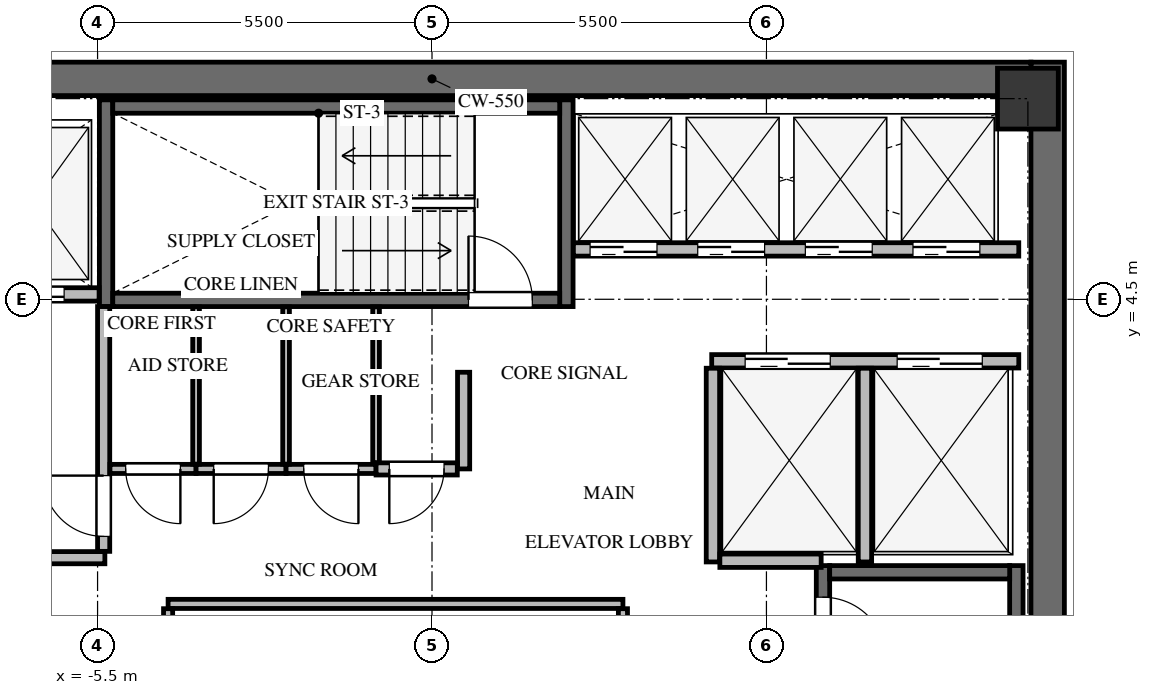
"""IFC4 building model, lengths in metres.
Left out: names, types, materials, properties, quantities, classifications, styles, units other than length and angle.
Written with IfcOpenShell. Run it as: python <this file> out.ifc"""

import sys

from ifc_helpers import new_model, si_unit, direction, frame, frame_2d, origin, origin_2d, place, context, subcontext, project, spatial, rectangle, extrude, source, transform, mapped, element, fill, save


model = new_model("IFC4")
c1 = context("Model", 3, precision=1e-05, world=origin(), true_north=direction((0.0, 1.0)))
c2 = subcontext(c1, "Body", "Model", "MODEL_VIEW")
j1 = project(units=[si_unit("LENGTHUNIT", "METRE"), si_unit("PLANEANGLEUNIT", "RADIAN")], contexts=[c1])
p1 = place(None, origin())
s1 = spatial("IfcSite", under=j1, at=p1, CompositionType="ELEMENT")
p2 = place(p1, origin())
s2 = spatial("IfcBuilding", under=s1, at=p2, CompositionType="ELEMENT")
p3 = place(p2, frame((0.0, 0.0, 261.5)))
s3 = spatial("IfcBuildingStorey", under=s2, at=p3, CompositionType="ELEMENT", Elevation=261.5)
p4 = place(p3, frame((10.125, -8.4, 0.0), z_axis=(0.0, 0.0, 1.0), x_axis=(0.0, 1.0, 0.0)))
e1 = element("IfcWall", 1, at=p4, inside=s3, PredefinedType="SHEAR", context=c2, shape_type="SweptSolid", body=[
    extrude(rectangle(XDim=16.8, YDim=0.55, at=frame_2d((8.4, 0.0))), origin(), (0.0, 0.0, 1.0), 3.4),
])
p5 = place(p3, frame((-9.85, 8.125, 0.0), z_axis=(0.0, 0.0, 1.0), x_axis=(1.0, 0.0, 0.0)))
e2 = element("IfcWall", 2, at=p5, inside=s3, PredefinedType="SHEAR", context=c2, shape_type="SweptSolid", body=[
    extrude(rectangle(XDim=19.7, YDim=0.55, at=frame_2d((9.85, 0.0))), origin(), (0.0, 0.0, 1.0), 3.4),
])
p6 = place(p3, frame((9.61, -7.77, -0.24), z_axis=(0.0, 0.0, 1.0), x_axis=(0.0, 1.0, 0.0)))
e3 = element("IfcWall", 3, at=p6, inside=s3, PredefinedType="SHEAR", context=c2, shape_type="SweptSolid", body=[
    extrude(rectangle(XDim=7.89, YDim=0.22, at=frame_2d((3.945, 0.0))), origin(), (0.0, 0.0, 1.0), 3.34),
])
p7 = place(p3, frame((6.43, 0.12, -0.24), z_axis=(0.0, 0.0, 1.0), x_axis=(0.0, -1.0, 0.0)))
e4 = element("IfcWall", 4, at=p7, inside=s3, PredefinedType="SHEAR", context=c2, shape_type="SweptSolid", body=[
    extrude(rectangle(XDim=7.89, YDim=0.22, at=frame_2d((3.945, 0.0))), origin(), (0.0, 0.0, 1.0), 3.34),
])
p8 = place(p7, frame((0.52, 0.0, 0.0)))
e5 = element("IfcOpeningElement", 5, at=p8, cuts=e4, PredefinedType="OPENING", context=c2, shape_type="SweptSolid", body=[
    extrude(rectangle(XDim=1.05, YDim=2.15, at=frame_2d((0.525, 1.075))), frame((0.0, 0.12, 0.0), z_axis=(0.0, -1.0, 0.0), x_axis=(1.0, 0.0, 0.0)), (0.0, 0.0, 1.0), 0.24),
])
p9 = place(p3, frame((9.5, 0.01, -0.24), z_axis=(0.0, 0.0, 1.0), x_axis=(-1.0, 0.0, 0.0)))
e6 = element("IfcWall", 6, at=p9, inside=s3, PredefinedType="SHEAR", context=c2, shape_type="SweptSolid", body=[
    extrude(rectangle(XDim=2.96, YDim=0.22, at=frame_2d((1.48, 0.0))), origin(), (0.0, 0.0, 1.0), 3.34),
])
for number, where, z_axis, x_axis in (
    (7, (2.21, 4.38, -0.24), (0.0, 0.0, 1.0), (0.0, 1.0, 0.0)),
    (8, (-5.36, 7.78, -0.24), (0.0, 0.0, 1.0), (0.0, -1.0, 0.0)),
):
    element("IfcWall", number, at=place(p3, frame(where, z_axis=z_axis, x_axis=x_axis)), inside=s3, PredefinedType="SHEAR", context=c2, shape_type="SweptSolid", body=[
        extrude(rectangle(XDim=3.4, YDim=0.22, at=frame_2d((1.7, 0.0))), origin(), (0.0, 0.0, 1.0), 3.34),
    ])
p10 = place(p3, frame((-5.25, 4.49, -0.24), z_axis=(0.0, 0.0, 1.0), x_axis=(1.0, 0.0, 0.0)))
e9 = element("IfcWall", 9, at=p10, inside=s3, PredefinedType="SHEAR", context=c2, shape_type="SweptSolid", body=[
    extrude(rectangle(XDim=7.35, YDim=0.22, at=frame_2d((3.675, 0.0))), origin(), (0.0, 0.0, 1.0), 3.34),
])
p11 = place(p10, frame((5.85, 0.0, 0.0)))
e10 = element("IfcOpeningElement", 10, at=p11, cuts=e9, PredefinedType="OPENING", context=c2, shape_type="SweptSolid", body=[
    extrude(rectangle(XDim=1.05, YDim=2.15, at=frame_2d((0.525, 1.075))), frame((0.0, 0.12, 0.0), z_axis=(0.0, -1.0, 0.0), x_axis=(1.0, 0.0, 0.0)), (0.0, 0.0, 1.0), 0.24),
])
p12 = place(p3, frame((2.1, 7.67, -0.24), z_axis=(0.0, 0.0, 1.0), x_axis=(-1.0, 0.0, 0.0)))
e11 = element("IfcWall", 11, at=p12, inside=s3, PredefinedType="SHEAR", context=c2, shape_type="SweptSolid", body=[
    extrude(rectangle(XDim=7.35, YDim=0.22, at=frame_2d((3.675, 0.0))), origin(), (0.0, 0.0, 1.0), 3.34),
])
m1 = source(origin(), c2, "Body", "SweptSolid", [
    extrude(rectangle(XDim=1.0, YDim=1.0, at=origin_2d()), origin(), (0.0, 0.0, 1.0), 3.34),
])
p13 = place(p3, frame((9.8, 7.8, -0.24), z_axis=(0.0, 0.0, 1.0), x_axis=(1.0, 0.0, 0.0)))
e12 = element("IfcColumn", 12, at=p13, inside=s3, PredefinedType="COLUMN", context=c2, shape_type="MappedRepresentation", body=[
    mapped(m1, transform((0.0, 0.0, 0.0), x_axis=(1.0, 0.0, 0.0), y_axis=(0.0, 1.0, 0.0), z_axis=(0.0, 0.0, 1.0), scale=1.0)),
])
p14 = place(p3, frame((-9.65, 4.58, 0.0), z_axis=(0.0, 0.0, 1.0), x_axis=(1.0, 0.0, 0.0)))
e13 = element("IfcWall", 13, at=p14, inside=s3, PredefinedType="SOLIDWALL", context=c2, shape_type="SweptSolid", body=[
    extrude(rectangle(XDim=4.175, YDim=0.22, at=frame_2d((2.087, 0.0))), origin(), (0.0, 0.0, 1.0), 3.085),
])
p15 = place(p14, frame((0.4, 0.0, 0.0)))
e14 = element("IfcOpeningElement", 14, at=p15, cuts=e13, PredefinedType="OPENING", context=c2, shape_type="SweptSolid", body=[
    extrude(rectangle(XDim=1.2, YDim=2.15, at=frame_2d((0.6, 1.075))), frame((0.0, 0.12, 0.0), z_axis=(0.0, -1.0, 0.0), x_axis=(1.0, 0.0, 0.0)), (0.0, 0.0, 1.0), 0.24),
])
p16 = place(p14, frame((2.4, 0.0, 0.0)))
e15 = element("IfcOpeningElement", 15, at=p16, cuts=e13, PredefinedType="OPENING", context=c2, shape_type="SweptSolid", body=[
    extrude(rectangle(XDim=1.2, YDim=2.15, at=frame_2d((0.6, 1.075))), frame((0.0, 0.12, 0.0), z_axis=(0.0, -1.0, 0.0), x_axis=(1.0, 0.0, 0.0)), (0.0, 0.0, 1.0), 0.24),
])
p17 = place(p3, frame((-9.65, 0.25, 0.0), z_axis=(0.0, 0.0, 1.0), x_axis=(1.0, 0.0, 0.0)))
e16 = element("IfcWall", 16, at=p17, inside=s3, PredefinedType="SOLIDWALL", context=c2, shape_type="SweptSolid", body=[
    extrude(rectangle(XDim=4.27, YDim=0.2, at=frame_2d((2.135, 0.0))), origin(), (0.0, 0.0, 1.0), 3.085),
])
p18 = place(p3, frame((-5.4, 0.354, 0.0), z_axis=(0.0, 0.0, 1.0), x_axis=(0.0, 1.0, 0.0)))
e17 = element("IfcWall", 17, at=p18, inside=s3, PredefinedType="SOLIDWALL", context=c2, shape_type="SweptSolid", body=[
    extrude(rectangle(XDim=4.026, YDim=0.2, at=frame_2d((2.013, 0.0))), origin(), (0.0, 0.0, 1.0), 3.085),
])
p19 = place(p18, frame((0.246, 0.0, 0.0)))
e18 = element("IfcOpeningElement", 18, at=p19, cuts=e17, PredefinedType="OPENING", context=c2, shape_type="SweptSolid", body=[
    extrude(rectangle(XDim=1.0, YDim=2.15, at=frame_2d((0.5, 1.075))), frame((0.0, 0.11, 0.0), z_axis=(0.0, -1.0, 0.0), x_axis=(1.0, 0.0, 0.0)), (0.0, 0.0, 1.0), 0.22),
])
p20 = place(p3, frame((4.6, 3.48, 0.0), z_axis=(0.0, 0.0, 1.0), x_axis=(1.0, 0.0, 0.0)))
e19 = element("IfcWall", 19, at=p20, inside=s3, PredefinedType="SOLIDWALL", context=c2, shape_type="SweptSolid", body=[
    extrude(rectangle(XDim=5.05, YDim=0.22, at=frame_2d((2.525, 0.0))), origin(), (0.0, 0.0, 1.0), 3.085),
])
p21 = place(p20, frame((0.55, 0.0, 0.0)))
e20 = element("IfcOpeningElement", 20, at=p21, cuts=e19, PredefinedType="OPENING", context=c2, shape_type="SweptSolid", body=[
    extrude(rectangle(XDim=1.4, YDim=2.15, at=frame_2d((0.7, 1.075))), frame((0.0, 0.12, 0.0), z_axis=(0.0, -1.0, 0.0), x_axis=(1.0, 0.0, 0.0)), (0.0, 0.0, 1.0), 0.24),
])
p22 = place(p20, frame((3.05, 0.0, 0.0)))
e21 = element("IfcOpeningElement", 21, at=p22, cuts=e19, PredefinedType="OPENING", context=c2, shape_type="SweptSolid", body=[
    extrude(rectangle(XDim=1.4, YDim=2.15, at=frame_2d((0.7, 1.075))), frame((0.0, 0.12, 0.0), z_axis=(0.0, -1.0, 0.0), x_axis=(1.0, 0.0, 0.0)), (0.0, 0.0, 1.0), 0.24),
])
for number, where, z_axis, x_axis in (
    (22, (4.62, 0.18, 0.0), (0.0, 0.0, 1.0), (0.0, 1.0, 0.0)),
    (23, (7.12, 0.18, 0.0), (0.0, 0.0, 1.0), (0.0, 1.0, 0.0)),
):
    element("IfcWall", number, at=place(p3, frame(where, z_axis=z_axis, x_axis=x_axis)), inside=s3, PredefinedType="SOLIDWALL", context=c2, shape_type="SweptSolid", body=[
        extrude(rectangle(XDim=3.186, YDim=0.22, at=frame_2d((1.593, 0.0))), origin(), (0.0, 0.0, 1.0), 3.085),
    ])
p23 = place(p3, frame((4.734, 0.2, 0.0), z_axis=(0.0, 0.0, 1.0), x_axis=(1.0, 0.0, 0.0)))
e24 = element("IfcWall", 24, at=p23, inside=s3, PredefinedType="SOLIDWALL", context=c2, shape_type="SweptSolid", body=[
    extrude(rectangle(XDim=1.666, YDim=0.22, at=frame_2d((0.833, 0.0))), origin(), (0.0, 0.0, 1.0), 3.085),
])
p24 = place(p3, frame((2.325, 5.32, 0.0), z_axis=(0.0, 0.0, 1.0), x_axis=(1.0, 0.0, 0.0)))
e25 = element("IfcWall", 25, at=p24, inside=s3, PredefinedType="SOLIDWALL", context=c2, shape_type="SweptSolid", body=[
    extrude(rectangle(XDim=7.325, YDim=0.22, at=frame_2d((3.663, 0.0))), origin(), (0.0, 0.0, 1.0), 3.085),
])
p25 = place(p24, frame((0.275, 0.0, 0.0)))
e26 = element("IfcOpeningElement", 26, at=p25, cuts=e25, PredefinedType="OPENING", context=c2, shape_type="SweptSolid", body=[
    extrude(rectangle(XDim=1.1, YDim=2.15, at=frame_2d((0.55, 1.075))), frame((0.0, 0.12, 0.0), z_axis=(0.0, -1.0, 0.0), x_axis=(1.0, 0.0, 0.0)), (0.0, 0.0, 1.0), 0.24),
])
p26 = place(p24, frame((2.045, 0.0, 0.0)))
e27 = element("IfcOpeningElement", 27, at=p26, cuts=e25, PredefinedType="OPENING", context=c2, shape_type="SweptSolid", body=[
    extrude(rectangle(XDim=1.1, YDim=2.15, at=frame_2d((0.55, 1.075))), frame((0.0, 0.12, 0.0), z_axis=(0.0, -1.0, 0.0), x_axis=(1.0, 0.0, 0.0)), (0.0, 0.0, 1.0), 0.24),
])
p27 = place(p24, frame((3.815, 0.0, 0.0)))
e28 = element("IfcOpeningElement", 28, at=p27, cuts=e25, PredefinedType="OPENING", context=c2, shape_type="SweptSolid", body=[
    extrude(rectangle(XDim=1.1, YDim=2.15, at=frame_2d((0.55, 1.075))), frame((0.0, 0.12, 0.0), z_axis=(0.0, -1.0, 0.0), x_axis=(1.0, 0.0, 0.0)), (0.0, 0.0, 1.0), 0.24),
])
p28 = place(p24, frame((5.585, 0.0, 0.0)))
e29 = element("IfcOpeningElement", 29, at=p28, cuts=e25, PredefinedType="OPENING", context=c2, shape_type="SweptSolid", body=[
    extrude(rectangle(XDim=1.1, YDim=2.15, at=frame_2d((0.55, 1.075))), frame((0.0, 0.12, 0.0), z_axis=(0.0, -1.0, 0.0), x_axis=(1.0, 0.0, 0.0)), (0.0, 0.0, 1.0), 0.24),
])
p29 = place(p3, frame((-4.34, -0.51, 0.0), z_axis=(0.0, 0.0, 1.0), x_axis=(1.0, 0.0, 0.0)))
e30 = element("IfcWall", 30, at=p29, inside=s3, PredefinedType="PARTITIONING", context=c2, shape_type="SweptSolid", body=[
    extrude(rectangle(XDim=7.48, YDim=0.15, at=frame_2d((3.74, 0.0))), origin(), (0.0, 0.0, 1.0), 3.085),
])
for number, where, z_axis, x_axis in (
    (31, (-4.34, -2.961, 0.0), (0.0, 0.0, 1.0), (0.0, 1.0, 0.0)),
    (32, (3.14, -0.589, 0.0), (0.0, 0.0, 1.0), (0.0, -1.0, 0.0)),
):
    element("IfcWall", number, at=place(p3, frame(where, z_axis=z_axis, x_axis=x_axis)), inside=s3, PredefinedType="PARTITIONING", context=c2, shape_type="SweptSolid", body=[
        extrude(rectangle(XDim=2.372, YDim=0.15, at=frame_2d((1.186, 0.0))), origin(), (0.0, 0.0, 1.0), 3.085),
    ])
p30 = place(p3, frame((-3.88, 1.71, 0.0), z_axis=(0.0, 0.0, 1.0), x_axis=(-1.0, 0.0, 0.0)))
e33 = element("IfcWall", 33, at=p30, inside=s3, PredefinedType="PARTITIONING", context=c2, shape_type="SweptSolid", body=[
    extrude(rectangle(XDim=1.416, YDim=0.15, at=frame_2d((0.708, 0.0))), origin(), (0.0, 0.0, 1.0), 3.085),
])
p31 = place(p30, frame((0.258, 0.0, 0.0)))
e34 = element("IfcOpeningElement", 34, at=p31, cuts=e33, PredefinedType="OPENING", context=c2, shape_type="SweptSolid", body=[
    extrude(rectangle(XDim=0.9, YDim=2.05, at=frame_2d((0.45, 1.025))), frame((0.0, 0.085, 0.0), z_axis=(0.0, -1.0, 0.0), x_axis=(1.0, 0.0, 0.0)), (0.0, 0.0, 1.0), 0.17),
])
p32 = place(p3, frame((-2.4, 1.71, 0.0), z_axis=(0.0, 0.0, 1.0), x_axis=(-1.0, 0.0, 0.0)))
e35 = element("IfcWall", 35, at=p32, inside=s3, PredefinedType="PARTITIONING", context=c2, shape_type="SweptSolid", body=[
    extrude(rectangle(XDim=1.48, YDim=0.15, at=frame_2d((0.74, 0.0))), origin(), (0.0, 0.0, 1.0), 3.085),
])
p33 = place(p32, frame((0.29, 0.0, 0.0)))
e36 = element("IfcOpeningElement", 36, at=p33, cuts=e35, PredefinedType="OPENING", context=c2, shape_type="SweptSolid", body=[
    extrude(rectangle(XDim=0.9, YDim=2.05, at=frame_2d((0.45, 1.025))), frame((0.0, 0.085, 0.0), z_axis=(0.0, -1.0, 0.0), x_axis=(1.0, 0.0, 0.0)), (0.0, 0.0, 1.0), 0.17),
])
p34 = place(p3, frame((-0.92, 1.71, 0.0), z_axis=(0.0, 0.0, 1.0), x_axis=(-1.0, 0.0, 0.0)))
e37 = element("IfcWall", 37, at=p34, inside=s3, PredefinedType="PARTITIONING", context=c2, shape_type="SweptSolid", body=[
    extrude(rectangle(XDim=1.48, YDim=0.15, at=frame_2d((0.74, 0.0))), origin(), (0.0, 0.0, 1.0), 3.085),
])
p35 = place(p34, frame((0.29, 0.0, 0.0)))
e38 = element("IfcOpeningElement", 38, at=p35, cuts=e37, PredefinedType="OPENING", context=c2, shape_type="SweptSolid", body=[
    extrude(rectangle(XDim=0.9, YDim=2.05, at=frame_2d((0.45, 1.025))), frame((0.0, 0.085, 0.0), z_axis=(0.0, -1.0, 0.0), x_axis=(1.0, 0.0, 0.0)), (0.0, 0.0, 1.0), 0.17),
])
p36 = place(p3, frame((0.52, 3.3, 0.0), z_axis=(0.0, 0.0, 1.0), x_axis=(0.0, -1.0, 0.0)))
e39 = element("IfcWall", 39, at=p36, inside=s3, PredefinedType="SOLIDWALL", context=c2, shape_type="SweptSolid", body=[
    extrude(rectangle(XDim=1.59, YDim=0.2, at=frame_2d((0.795, 0.0))), origin(), (0.0, 0.0, 1.0), 3.085),
])
p37 = place(p3, frame((0.416, 1.71, 0.0), z_axis=(0.0, 0.0, 1.0), x_axis=(-1.0, 0.0, 0.0)))
e40 = element("IfcWall", 40, at=p37, inside=s3, PredefinedType="SOLIDWALL", context=c2, shape_type="SweptSolid", body=[
    extrude(rectangle(XDim=1.336, YDim=0.2, at=frame_2d((0.668, 0.0))), origin(), (0.0, 0.0, 1.0), 3.085),
])
p38 = place(p37, frame((0.218, 0.0, 0.0)))
e41 = element("IfcOpeningElement", 41, at=p38, cuts=e40, PredefinedType="OPENING", context=c2, shape_type="SweptSolid", body=[
    extrude(rectangle(XDim=0.9, YDim=2.05, at=frame_2d((0.45, 1.025))), frame((0.0, 0.11, 0.0), z_axis=(0.0, -1.0, 0.0), x_axis=(1.0, 0.0, 0.0)), (0.0, 0.0, 1.0), 0.22),
])
for number, where, z_axis, x_axis in (
    (42, (-3.88, 4.375, 0.0), (0.0, 0.0, 1.0), (0.0, -1.0, 0.0)),
    (43, (-2.4, 4.375, 0.0), (0.0, 0.0, 1.0), (0.0, -1.0, 0.0)),
):
    element("IfcWall", number, at=place(p3, frame(where, z_axis=z_axis, x_axis=x_axis)), inside=s3, PredefinedType="MOVABLE", context=c2, shape_type="SweptSolid", body=[
        extrude(rectangle(XDim=2.586, YDim=0.11, at=frame_2d((1.293, 0.0))), origin(), (0.0, 0.0, 1.0), 3.085),
    ])
p39 = place(p3, frame((-0.92, 4.375, 0.0), z_axis=(0.0, 0.0, 1.0), x_axis=(0.0, -1.0, 0.0)))
e44 = element("IfcWall", 44, at=p39, inside=s3, PredefinedType="MOVABLE", context=c2, shape_type="SweptSolid", body=[
    extrude(rectangle(XDim=2.561, YDim=0.11, at=frame_2d((1.281, 0.0))), origin(), (0.0, 0.0, 1.0), 3.085),
])
m2 = source(origin(), c2, "Body", "SweptSolid", [
    extrude(rectangle(XDim=1.05, YDim=2.15, at=frame_2d((0.525, 1.075))), frame((0.0, 0.025, 0.0), z_axis=(0.0, -1.0, 0.0), x_axis=(1.0, 0.0, 0.0)), (0.0, 0.0, 1.0), 0.05),
])
p40 = place(p8, origin())
e45 = element("IfcDoor", 45, at=p40, inside=s3, OperationType="SINGLE_SWING_RIGHT", PredefinedType="DOOR", context=c2, shape_type="MappedRepresentation", body=[
    mapped(m2, transform((0.0, 0.0, 0.0), x_axis=(1.0, 0.0, 0.0), y_axis=(0.0, 1.0, 0.0), z_axis=(0.0, 0.0, 1.0), scale=1.0)),
])
fill(e5, e45)
m3 = source(origin(), c2, "Body", "SweptSolid", [
    extrude(rectangle(XDim=1.05, YDim=2.15, at=frame_2d((0.525, 1.075))), frame((0.0, 0.025, 0.0), z_axis=(0.0, -1.0, 0.0), x_axis=(1.0, 0.0, 0.0)), (0.0, 0.0, 1.0), 0.05),
])
p41 = place(p11, origin())
e46 = element("IfcDoor", 46, at=p41, inside=s3, OperationType="SINGLE_SWING_LEFT", PredefinedType="DOOR", context=c2, shape_type="MappedRepresentation", body=[
    mapped(m3, transform((0.0, 0.0, 0.0), x_axis=(1.0, 0.0, 0.0), y_axis=(0.0, 1.0, 0.0), z_axis=(0.0, 0.0, 1.0), scale=1.0)),
])
fill(e10, e46)
m4 = source(origin(), c2, "Body", "SweptSolid", [
    extrude(rectangle(XDim=1.2, YDim=2.15, at=frame_2d((0.6, 1.075))), frame((0.0, 0.025, 0.0), z_axis=(0.0, -1.0, 0.0), x_axis=(1.0, 0.0, 0.0)), (0.0, 0.0, 1.0), 0.05),
])
p42 = place(p16, origin())
e47 = element("IfcDoor", 47, at=p42, inside=s3, OperationType="DOUBLE_DOOR_SLIDING", PredefinedType="DOOR", context=c2, shape_type="MappedRepresentation", body=[
    mapped(m4, transform((0.0, 0.0, 0.0), x_axis=(1.0, 0.0, 0.0), y_axis=(0.0, 1.0, 0.0), z_axis=(0.0, 0.0, 1.0), scale=1.0)),
])
fill(e15, e47)
m5 = source(origin(), c2, "Body", "SweptSolid", [
    extrude(rectangle(XDim=1.0, YDim=2.15, at=frame_2d((0.5, 1.075))), frame((0.0, 0.025, 0.0), z_axis=(0.0, -1.0, 0.0), x_axis=(1.0, 0.0, 0.0)), (0.0, 0.0, 1.0), 0.05),
])
p43 = place(p19, origin())
e48 = element("IfcDoor", 48, at=p43, inside=s3, OperationType="SINGLE_SWING_RIGHT", PredefinedType="DOOR", context=c2, shape_type="MappedRepresentation", body=[
    mapped(m5, transform((0.0, 0.0, 0.0), x_axis=(1.0, 0.0, 0.0), y_axis=(0.0, 1.0, 0.0), z_axis=(0.0, 0.0, 1.0), scale=1.0)),
])
fill(e18, e48)
m6 = source(origin(), c2, "Body", "SweptSolid", [
    extrude(rectangle(XDim=1.4, YDim=2.15, at=frame_2d((0.7, 1.075))), frame((0.0, 0.025, 0.0), z_axis=(0.0, -1.0, 0.0), x_axis=(1.0, 0.0, 0.0)), (0.0, 0.0, 1.0), 0.05),
])
p44 = place(p21, origin())
e49 = element("IfcDoor", 49, at=p44, inside=s3, OperationType="DOUBLE_DOOR_SLIDING", PredefinedType="DOOR", context=c2, shape_type="MappedRepresentation", body=[
    mapped(m6, transform((0.0, 0.0, 0.0), x_axis=(1.0, 0.0, 0.0), y_axis=(0.0, 1.0, 0.0), z_axis=(0.0, 0.0, 1.0), scale=1.0)),
])
fill(e20, e49)
p45 = place(p22, origin())
e50 = element("IfcDoor", 50, at=p45, inside=s3, OperationType="DOUBLE_DOOR_SLIDING", PredefinedType="DOOR", context=c2, shape_type="MappedRepresentation", body=[
    mapped(m6, transform((0.0, 0.0, 0.0), x_axis=(1.0, 0.0, 0.0), y_axis=(0.0, 1.0, 0.0), z_axis=(0.0, 0.0, 1.0), scale=1.0)),
])
fill(e21, e50)
m7 = source(origin(), c2, "Body", "SweptSolid", [
    extrude(rectangle(XDim=1.1, YDim=2.15, at=frame_2d((0.55, 1.075))), frame((0.0, 0.025, 0.0), z_axis=(0.0, -1.0, 0.0), x_axis=(1.0, 0.0, 0.0)), (0.0, 0.0, 1.0), 0.05),
])
p46 = place(p25, origin())
e51 = element("IfcDoor", 51, at=p46, inside=s3, OperationType="DOUBLE_DOOR_SLIDING", PredefinedType="DOOR", context=c2, shape_type="MappedRepresentation", body=[
    mapped(m7, transform((0.0, 0.0, 0.0), x_axis=(1.0, 0.0, 0.0), y_axis=(0.0, 1.0, 0.0), z_axis=(0.0, 0.0, 1.0), scale=1.0)),
])
fill(e26, e51)
p47 = place(p26, origin())
e52 = element("IfcDoor", 52, at=p47, inside=s3, OperationType="DOUBLE_DOOR_SLIDING", PredefinedType="DOOR", context=c2, shape_type="MappedRepresentation", body=[
    mapped(m7, transform((0.0, 0.0, 0.0), x_axis=(1.0, 0.0, 0.0), y_axis=(0.0, 1.0, 0.0), z_axis=(0.0, 0.0, 1.0), scale=1.0)),
])
fill(e27, e52)
p48 = place(p27, origin())
e53 = element("IfcDoor", 53, at=p48, inside=s3, OperationType="DOUBLE_DOOR_SLIDING", PredefinedType="DOOR", context=c2, shape_type="MappedRepresentation", body=[
    mapped(m7, transform((0.0, 0.0, 0.0), x_axis=(1.0, 0.0, 0.0), y_axis=(0.0, 1.0, 0.0), z_axis=(0.0, 0.0, 1.0), scale=1.0)),
])
fill(e28, e53)
p49 = place(p28, origin())
e54 = element("IfcDoor", 54, at=p49, inside=s3, OperationType="DOUBLE_DOOR_SLIDING", PredefinedType="DOOR", context=c2, shape_type="MappedRepresentation", body=[
    mapped(m7, transform((0.0, 0.0, 0.0), x_axis=(1.0, 0.0, 0.0), y_axis=(0.0, 1.0, 0.0), z_axis=(0.0, 0.0, 1.0), scale=1.0)),
])
fill(e29, e54)
m8 = source(origin(), c2, "Body", "SweptSolid", [
    extrude(rectangle(XDim=0.9, YDim=2.05, at=frame_2d((0.45, 1.025))), frame((0.0, 0.025, 0.0), z_axis=(0.0, -1.0, 0.0), x_axis=(1.0, 0.0, 0.0)), (0.0, 0.0, 1.0), 0.05),
])
p50 = place(p31, origin())
e55 = element("IfcDoor", 55, at=p50, inside=s3, OperationType="SINGLE_SWING_LEFT", PredefinedType="DOOR", context=c2, shape_type="MappedRepresentation", body=[
    mapped(m8, transform((0.0, 0.0, 0.0), x_axis=(1.0, 0.0, 0.0), y_axis=(0.0, 1.0, 0.0), z_axis=(0.0, 0.0, 1.0), scale=1.0)),
])
fill(e34, e55)
m9 = source(origin(), c2, "Body", "SweptSolid", [
    extrude(rectangle(XDim=0.9, YDim=2.05, at=frame_2d((0.45, 1.025))), frame((0.0, 0.025, 0.0), z_axis=(0.0, -1.0, 0.0), x_axis=(1.0, 0.0, 0.0)), (0.0, 0.0, 1.0), 0.05),
])
p51 = place(p33, origin())
e56 = element("IfcDoor", 56, at=p51, inside=s3, OperationType="SINGLE_SWING_RIGHT", PredefinedType="DOOR", context=c2, shape_type="MappedRepresentation", body=[
    mapped(m9, transform((0.0, 0.0, 0.0), x_axis=(1.0, 0.0, 0.0), y_axis=(0.0, 1.0, 0.0), z_axis=(0.0, 0.0, 1.0), scale=1.0)),
])
fill(e36, e56)
p52 = place(p35, origin())
e57 = element("IfcDoor", 57, at=p52, inside=s3, OperationType="SINGLE_SWING_LEFT", PredefinedType="DOOR", context=c2, shape_type="MappedRepresentation", body=[
    mapped(m8, transform((0.0, 0.0, 0.0), x_axis=(1.0, 0.0, 0.0), y_axis=(0.0, 1.0, 0.0), z_axis=(0.0, 0.0, 1.0), scale=1.0)),
])
fill(e38, e57)
p53 = place(p38, origin())
e58 = element("IfcDoor", 58, at=p53, inside=s3, OperationType="SINGLE_SWING_RIGHT", PredefinedType="DOOR", context=c2, shape_type="MappedRepresentation", body=[
    mapped(m9, transform((0.0, 0.0, 0.0), x_axis=(1.0, 0.0, 0.0), y_axis=(0.0, 1.0, 0.0), z_axis=(0.0, 0.0, 1.0), scale=1.0)),
])
fill(e41, e58)
save(model, sys.argv[1])
